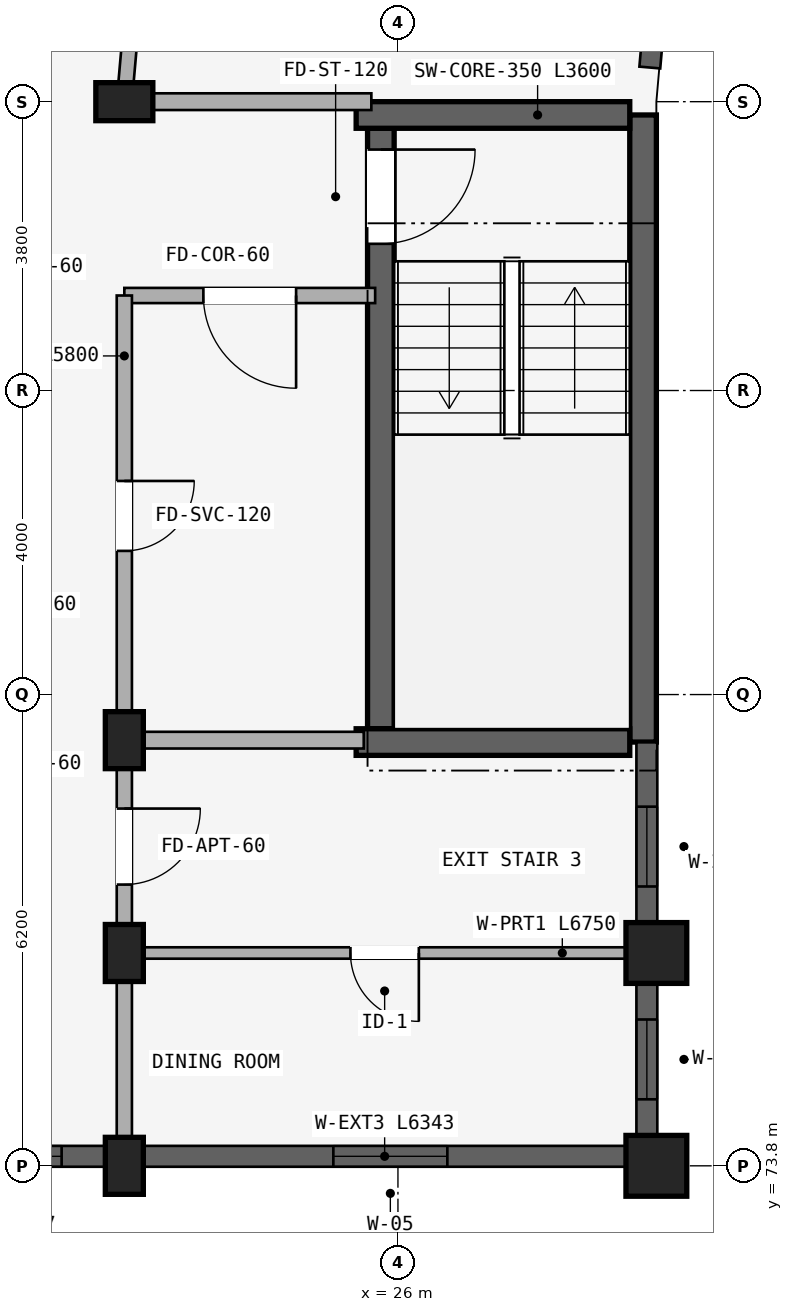
"""IFC4 building model, lengths in metres.
Left out: names, types, materials, properties, quantities, classifications, styles, units other than length and angle.
Written with IfcOpenShell. Run it as: python <this file> out.ifc"""

import sys

from ifc_helpers import new_model, si_unit, direction, frame, frame_2d, origin, origin_2d, place, context, subcontext, project, spatial, rectangle, extrude, element, fill, save


model = new_model("IFC4")
c1 = context("Model", 3, precision=1e-05, world=origin(), true_north=direction((0.0, 1.0)))
c2 = subcontext(c1, "Body", "Model", "MODEL_VIEW")
j1 = project(units=[si_unit("LENGTHUNIT", "METRE"), si_unit("PLANEANGLEUNIT", "RADIAN")], contexts=[c1])
p1 = place(None, origin())
s1 = spatial("IfcSite", under=j1, at=p1, CompositionType="ELEMENT")
p2 = place(p1, origin())
s2 = spatial("IfcBuilding", under=s1, at=p2, CompositionType="ELEMENT")
p3 = place(p2, frame((0.0, 0.0, 8.7)))
s3 = spatial("IfcBuildingStorey", under=s2, at=p3, CompositionType="ELEMENT", Elevation=8.7)
p4 = place(p3, frame((29.225, 87.625, 0.0), z_axis=(0.0, 0.0, 1.0), x_axis=(0.0, -1.0, 0.0)))
e1 = element("IfcWall", 1, at=p4, inside=s3, PredefinedType="SHEAR", context=c2, shape_type="SweptSolid", body=[
    extrude(rectangle(XDim=8.25, YDim=0.35, at=frame_2d((4.125, 0.0))), origin(), (0.0, 0.0, 1.0), 2.93),
])
p5 = place(p3, frame((25.775, 87.45, 0.0), z_axis=(0.0, 0.0, 1.0), x_axis=(0.0, -1.0, 0.0)))
e2 = element("IfcWall", 2, at=p5, inside=s3, PredefinedType="SHEAR", context=c2, shape_type="SweptSolid", body=[
    extrude(rectangle(XDim=7.9, YDim=0.35, at=frame_2d((3.95, 0.0))), origin(), (0.0, 0.0, 1.0), 2.93),
])
p6 = place(p5, frame((0.28, 0.0, 0.0)))
e3 = element("IfcOpeningElement", 3, at=p6, cuts=e2, PredefinedType="OPENING", context=c2, shape_type="SweptSolid", body=[
    extrude(rectangle(XDim=1.24, YDim=2.15, at=frame_2d((0.62, 1.075))), frame((0.0, 0.185, 0.0), z_axis=(0.0, -1.0, 0.0), x_axis=(1.0, 0.0, 0.0)), (0.0, 0.0, 1.0), 0.37),
])
for number, where, z_axis, x_axis in (
    (4, (29.05, 87.625, 0.0), (0.0, 0.0, 1.0), (-1.0, 0.0, 0.0)),
    (5, (29.05, 79.375, 0.0), (0.0, 0.0, 1.0), (-1.0, 0.0, 0.0)),
):
    element("IfcWall", number, at=place(p3, frame(where, z_axis=z_axis, x_axis=x_axis)), inside=s3, PredefinedType="SHEAR", context=c2, shape_type="SweptSolid", body=[
        extrude(rectangle(XDim=3.6, YDim=0.35, at=frame_2d((1.8, 0.0))), origin(), (0.0, 0.0, 1.0), 2.93),
    ])
for number, where, z_axis, x_axis in (
    (6, (22.4, 87.8, 0.0), (0.0, 0.0, 1.0), (0.0, 1.0, 0.0)),
    (7, (22.4, 79.4, 0.0), (0.0, 0.0, 1.0), (1.0, 0.0, 0.0)),
):
    element("IfcColumn", number, at=place(p3, frame(where, z_axis=z_axis, x_axis=x_axis)), inside=s3, PredefinedType="COLUMN", context=c2, shape_type="SweptSolid", body=[
        extrude(rectangle(XDim=0.5, YDim=0.75, at=origin_2d()), origin(), (0.0, 0.0, 1.0), 2.93),
    ])
p7 = place(p3, frame((29.4, 76.6, 0.0), z_axis=(0.0, 0.0, 1.0), x_axis=(1.0, 0.0, 0.0)))
e8 = element("IfcColumn", 8, at=p7, inside=s3, PredefinedType="COLUMN", context=c2, shape_type="SweptSolid", body=[
    extrude(rectangle(XDim=0.8, YDim=0.8, at=origin_2d()), origin(), (0.0, 0.0, 1.0), 2.93),
])
p8 = place(p3, frame((22.4, 76.6, 0.0), z_axis=(0.0, 0.0, 1.0), x_axis=(1.0, 0.0, 0.0)))
e9 = element("IfcColumn", 9, at=p8, inside=s3, PredefinedType="COLUMN", context=c2, shape_type="SweptSolid", body=[
    extrude(rectangle(XDim=0.5, YDim=0.75, at=origin_2d()), origin(), (0.0, 0.0, 1.0), 2.93),
])
p9 = place(p3, frame((29.4, 73.8, 0.0), z_axis=(0.0, 0.0, 1.0), x_axis=(1.0, 0.0, 0.0)))
e10 = element("IfcColumn", 10, at=p9, inside=s3, PredefinedType="COLUMN", context=c2, shape_type="SweptSolid", body=[
    extrude(rectangle(XDim=0.8, YDim=0.8, at=origin_2d()), origin(), (0.0, 0.0, 1.0), 2.93),
])
p10 = place(p3, frame((22.4, 73.8, 0.0), z_axis=(0.0, 0.0, 1.0), x_axis=(1.0, 0.0, 0.0)))
e11 = element("IfcColumn", 11, at=p10, inside=s3, PredefinedType="COLUMN", context=c2, shape_type="SweptSolid", body=[
    extrude(rectangle(XDim=0.5, YDim=0.75, at=origin_2d()), origin(), (0.0, 0.0, 1.0), 2.93),
])
p11 = place(p3, frame((25.7, 85.25, 0.0), z_axis=(0.0, 0.0, 1.0), x_axis=(-1.0, 0.0, 0.0)))
e12 = element("IfcWall", 12, at=p11, inside=s3, PredefinedType="STANDARD", context=c2, shape_type="SweptSolid", body=[
    extrude(rectangle(XDim=3.3, YDim=0.2, at=frame_2d((1.65, 0.0))), origin(), (0.0, 0.0, 1.0), 2.372),
])
p12 = place(p11, frame((1.04, 0.0, 0.0)))
e13 = element("IfcOpeningElement", 13, at=p12, cuts=e12, PredefinedType="OPENING", context=c2, shape_type="SweptSolid", body=[
    extrude(rectangle(XDim=1.22, YDim=2.15, at=frame_2d((0.61, 1.075))), frame((0.0, 0.11, 0.0), z_axis=(0.0, -1.0, 0.0), x_axis=(1.0, 0.0, 0.0)), (0.0, 0.0, 1.0), 0.22),
])
p13 = place(p3, frame((22.4, 85.25, 0.0), z_axis=(0.0, 0.0, 1.0), x_axis=(0.0, -1.0, 0.0)))
e14 = element("IfcWall", 14, at=p13, inside=s3, PredefinedType="STANDARD", context=c2, shape_type="SweptSolid", body=[
    extrude(rectangle(XDim=5.8, YDim=0.2, at=frame_2d((2.9, 0.0))), origin(), (0.0, 0.0, 1.0), 2.372),
])
p14 = place(p13, frame((2.44, 0.0, 0.0)))
e15 = element("IfcOpeningElement", 15, at=p14, cuts=e14, PredefinedType="OPENING", context=c2, shape_type="SweptSolid", body=[
    extrude(rectangle(XDim=0.92, YDim=2.1, at=frame_2d((0.46, 1.05))), frame((0.0, 0.11, 0.0), z_axis=(0.0, -1.0, 0.0), x_axis=(1.0, 0.0, 0.0)), (0.0, 0.0, 1.0), 0.22),
])
p15 = place(p3, frame((22.792, 92.28, 0.0), z_axis=(0.0, 0.0, 1.0), x_axis=(-0.087187153726, -0.996191949488, 0.0)))
e16 = element("IfcWall", 16, at=p15, inside=s3, PredefinedType="STANDARD", context=c2, shape_type="SweptSolid", body=[
    extrude(rectangle(XDim=4.497, YDim=0.2, at=frame_2d((2.249, 0.0))), origin(), (0.0, 0.0, 1.0), 2.372),
])
p16 = place(p3, frame((25.65, 87.8, 0.0), z_axis=(0.0, 0.0, 1.0), x_axis=(-1.0, 0.0, 0.0)))
e17 = element("IfcWall", 17, at=p16, inside=s3, PredefinedType="STANDARD", context=c2, shape_type="SweptSolid", body=[
    extrude(rectangle(XDim=3.2, YDim=0.22, at=frame_2d((1.6, 0.0))), origin(), (0.0, 0.0, 1.0), 2.372),
])
p17 = place(p3, frame((22.4, 79.4, 0.0), z_axis=(0.0, 0.0, 1.0), x_axis=(0.0, -1.0, 0.0)))
e18 = element("IfcWall", 18, at=p17, inside=s3, PredefinedType="STANDARD", context=c2, shape_type="SweptSolid", body=[
    extrude(rectangle(XDim=2.8, YDim=0.2, at=frame_2d((1.4, 0.0))), origin(), (0.0, 0.0, 1.0), 2.372),
])
p18 = place(p17, frame((0.9, 0.0, 0.0)))
e19 = element("IfcOpeningElement", 19, at=p18, cuts=e18, PredefinedType="OPENING", context=c2, shape_type="SweptSolid", body=[
    extrude(rectangle(XDim=1.0, YDim=2.15, at=frame_2d((0.5, 1.075))), frame((0.0, 0.11, 0.0), z_axis=(0.0, -1.0, 0.0), x_axis=(1.0, 0.0, 0.0)), (0.0, 0.0, 1.0), 0.22),
])
p19 = place(p3, frame((25.55, 79.4, 0.0), z_axis=(0.0, 0.0, 1.0), x_axis=(-1.0, 0.0, 0.0)))
e20 = element("IfcWall", 20, at=p19, inside=s3, PredefinedType="STANDARD", context=c2, shape_type="SweptSolid", body=[
    extrude(rectangle(XDim=3.1, YDim=0.22, at=frame_2d((1.55, 0.0))), origin(), (0.0, 0.0, 1.0), 2.372),
])
p20 = place(p3, frame((22.4, 76.6, 0.0), z_axis=(0.0, 0.0, 1.0), x_axis=(0.0, -1.0, 0.0)))
e21 = element("IfcWall", 21, at=p20, inside=s3, PredefinedType="STANDARD", context=c2, shape_type="SweptSolid", body=[
    extrude(rectangle(XDim=2.8, YDim=0.2, at=frame_2d((1.4, 0.0))), origin(), (0.0, 0.0, 1.0), 2.372),
])
p21 = place(p3, frame((29.2, 76.6, 0.0), z_axis=(0.0, 0.0, 1.0), x_axis=(-1.0, 0.0, 0.0)))
e22 = element("IfcWall", 22, at=p21, inside=s3, PredefinedType="PARTITIONING", context=c2, shape_type="SweptSolid", body=[
    extrude(rectangle(XDim=6.75, YDim=0.15, at=frame_2d((3.375, 0.0))), origin(), (0.0, 0.0, 1.0), 2.372),
])
p22 = place(p21, frame((2.925, 0.0, 0.0)))
e23 = element("IfcOpeningElement", 23, at=p22, cuts=e22, PredefinedType="OPENING", context=c2, shape_type="SweptSolid", body=[
    extrude(rectangle(XDim=0.9, YDim=2.1, at=frame_2d((0.45, 1.05))), frame((0.0, 0.085, 0.0), z_axis=(0.0, -1.0, 0.0), x_axis=(1.0, 0.0, 0.0)), (0.0, 0.0, 1.0), 0.17),
])
p23 = place(p3, frame((29.537, 90.797, 0.0), z_axis=(0.0, 0.0, 1.0), x_axis=(-0.08716102895, -0.996194235595, 0.0)))
e24 = element("IfcWall", 24, at=p23, inside=s3, PredefinedType="STANDARD", context=c2, shape_type="SweptSolid", body=[
    extrude(rectangle(XDim=2.557, YDim=0.275, at=frame_2d((1.279, 0.0))), origin(), (0.0, 0.0, 1.0), 2.472),
])
p24 = place(p23, frame((0.609, 0.0, 0.622)))
e25 = element("IfcOpeningElement", 25, at=p24, cuts=e24, PredefinedType="OPENING", context=c2, shape_type="SweptSolid", body=[
    extrude(rectangle(XDim=1.5, YDim=1.65, at=frame_2d((0.75, 0.825))), frame((0.0, 0.147, 0.0), z_axis=(0.0, -1.0, 0.0), x_axis=(1.0, 0.0, 0.0)), (0.0, 0.0, 1.0), 0.295),
])
p25 = place(p3, frame((29.275, 79.372, 0.0), z_axis=(0.0, 0.0, 1.0), x_axis=(0.0, -1.0, 0.0)))
e26 = element("IfcWall", 26, at=p25, inside=s3, PredefinedType="STANDARD", context=c2, shape_type="SweptSolid", body=[
    extrude(rectangle(XDim=2.368, YDim=0.275, at=frame_2d((1.184, 0.0))), origin(), (0.0, 0.0, 1.0), 2.472),
])
p26 = place(p25, frame((0.846, 0.0, 0.88)))
e27 = element("IfcOpeningElement", 27, at=p26, cuts=e26, PredefinedType="OPENING", context=c2, shape_type="SweptSolid", body=[
    extrude(rectangle(XDim=1.05, YDim=1.25, at=frame_2d((0.525, 0.625))), frame((0.0, 0.147, 0.0), z_axis=(0.0, -1.0, 0.0), x_axis=(1.0, 0.0, 0.0)), (0.0, 0.0, 1.0), 0.295),
])
p27 = place(p3, frame((29.275, 76.197, 0.0), z_axis=(0.0, 0.0, 1.0), x_axis=(0.0, -1.0, 0.0)))
e28 = element("IfcWall", 28, at=p27, inside=s3, PredefinedType="STANDARD", context=c2, shape_type="SweptSolid", body=[
    extrude(rectangle(XDim=1.993, YDim=0.275, at=frame_2d((0.997, 0.0))), origin(), (0.0, 0.0, 1.0), 2.472),
])
p28 = place(p27, frame((0.471, 0.0, 0.88)))
e29 = element("IfcOpeningElement", 29, at=p28, cuts=e28, PredefinedType="OPENING", context=c2, shape_type="SweptSolid", body=[
    extrude(rectangle(XDim=1.05, YDim=1.25, at=frame_2d((0.525, 0.625))), frame((0.0, 0.147, 0.0), z_axis=(0.0, -1.0, 0.0), x_axis=(1.0, 0.0, 0.0)), (0.0, 0.0, 1.0), 0.295),
])
p29 = place(p3, frame((28.997, 73.925, 0.0), z_axis=(0.0, 0.0, 1.0), x_axis=(-1.0, 0.0, 0.0)))
e30 = element("IfcWall", 30, at=p29, inside=s3, PredefinedType="STANDARD", context=c2, shape_type="SweptSolid", body=[
    extrude(rectangle(XDim=6.343, YDim=0.275, at=frame_2d((3.171, 0.0))), origin(), (0.0, 0.0, 1.0), 2.372),
])
p30 = place(p29, frame((2.346, 0.0, 0.522)))
e31 = element("IfcOpeningElement", 31, at=p30, cuts=e30, PredefinedType="OPENING", context=c2, shape_type="SweptSolid", body=[
    extrude(rectangle(XDim=1.5, YDim=1.65, at=frame_2d((0.75, 0.825))), frame((0.0, 0.147, 0.0), z_axis=(0.0, -1.0, 0.0), x_axis=(1.0, 0.0, 0.0)), (0.0, 0.0, 1.0), 0.295),
])
p31 = place(p3, frame((22.146, 73.925, 0.0), z_axis=(0.0, 0.0, 1.0), x_axis=(-1.0, 0.0, 0.0)))
e32 = element("IfcWall", 32, at=p31, inside=s3, PredefinedType="STANDARD", context=c2, shape_type="SweptSolid", body=[
    extrude(rectangle(XDim=1.893, YDim=0.275, at=frame_2d((0.947, 0.0))), origin(), (0.0, 0.0, 1.0), 2.372),
])
p32 = place(p31, frame((0.572, 0.0, 0.88)))
e33 = element("IfcOpeningElement", 33, at=p32, cuts=e32, PredefinedType="OPENING", context=c2, shape_type="SweptSolid", body=[
    extrude(rectangle(XDim=0.75, YDim=1.05, at=frame_2d((0.375, 0.525))), frame((0.0, 0.147, 0.0), z_axis=(0.0, -1.0, 0.0), x_axis=(1.0, 0.0, 0.0)), (0.0, 0.0, 1.0), 0.295),
])
p33 = place(p26, origin())
e34 = element("IfcWindow", 34, at=p33, inside=s3, PartitioningType="SINGLE_PANEL", PredefinedType="WINDOW", context=c2, shape_type="SweptSolid", body=[
    extrude(rectangle(XDim=1.05, YDim=1.25, at=frame_2d((0.525, 0.625))), frame((0.0, 0.03, 0.0), z_axis=(0.0, -1.0, 0.0), x_axis=(1.0, 0.0, 0.0)), (0.0, 0.0, 1.0), 0.06),
])
fill(e27, e34)
p34 = place(p28, origin())
e35 = element("IfcWindow", 35, at=p34, inside=s3, PartitioningType="SINGLE_PANEL", PredefinedType="WINDOW", context=c2, shape_type="SweptSolid", body=[
    extrude(rectangle(XDim=1.05, YDim=1.25, at=frame_2d((0.525, 0.625))), frame((0.0, 0.03, 0.0), z_axis=(0.0, -1.0, 0.0), x_axis=(1.0, 0.0, 0.0)), (0.0, 0.0, 1.0), 0.06),
])
fill(e29, e35)
p35 = place(p30, origin())
e36 = element("IfcWindow", 36, at=p35, inside=s3, PartitioningType="DOUBLE_PANEL_VERTICAL", PredefinedType="WINDOW", context=c2, shape_type="SweptSolid", body=[
    extrude(rectangle(XDim=1.5, YDim=1.65, at=frame_2d((0.75, 0.825))), frame((0.0, 0.03, 0.0), z_axis=(0.0, -1.0, 0.0), x_axis=(1.0, 0.0, 0.0)), (0.0, 0.0, 1.0), 0.06),
])
fill(e31, e36)
p36 = place(p32, origin())
e37 = element("IfcWindow", 37, at=p36, inside=s3, PartitioningType="SINGLE_PANEL", PredefinedType="WINDOW", context=c2, shape_type="SweptSolid", body=[
    extrude(rectangle(XDim=0.75, YDim=1.05, at=frame_2d((0.375, 0.525))), frame((0.0, 0.03, 0.0), z_axis=(0.0, -1.0, 0.0), x_axis=(1.0, 0.0, 0.0)), (0.0, 0.0, 1.0), 0.06),
])
fill(e33, e37)
p37 = place(p6, origin())
e38 = element("IfcDoor", 38, at=p37, inside=s3, OperationType="SINGLE_SWING_LEFT", PredefinedType="DOOR", context=c2, shape_type="SweptSolid", body=[
    extrude(rectangle(XDim=1.24, YDim=2.15, at=frame_2d((0.62, 1.075))), frame((0.0, 0.025, 0.0), z_axis=(0.0, -1.0, 0.0), x_axis=(1.0, 0.0, 0.0)), (0.0, 0.0, 1.0), 0.05),
])
fill(e3, e38)
p38 = place(p12, origin())
e39 = element("IfcDoor", 39, at=p38, inside=s3, OperationType="SINGLE_SWING_LEFT", PredefinedType="DOOR", context=c2, shape_type="SweptSolid", body=[
    extrude(rectangle(XDim=1.22, YDim=2.15, at=frame_2d((0.61, 1.075))), frame((0.0, 0.025, 0.0), z_axis=(0.0, -1.0, 0.0), x_axis=(1.0, 0.0, 0.0)), (0.0, 0.0, 1.0), 0.05),
])
fill(e13, e39)
p39 = place(p14, frame((0.92, 0.0, 0.0), z_axis=(0.0, 0.0, 1.0), x_axis=(-1.0, 0.0, 0.0)))
e40 = element("IfcDoor", 40, at=p39, inside=s3, OperationType="SINGLE_SWING_RIGHT", PredefinedType="DOOR", context=c2, shape_type="SweptSolid", body=[
    extrude(rectangle(XDim=0.92, YDim=2.1, at=frame_2d((0.46, 1.05))), frame((0.0, 0.025, 0.0), z_axis=(0.0, -1.0, 0.0), x_axis=(1.0, 0.0, 0.0)), (0.0, 0.0, 1.0), 0.05),
])
fill(e15, e40)
p40 = place(p18, frame((1.0, 0.0, 0.0), z_axis=(0.0, 0.0, 1.0), x_axis=(-1.0, 0.0, 0.0)))
e41 = element("IfcDoor", 41, at=p40, inside=s3, OperationType="SINGLE_SWING_RIGHT", PredefinedType="DOOR", context=c2, shape_type="SweptSolid", body=[
    extrude(rectangle(XDim=1.0, YDim=2.15, at=frame_2d((0.5, 1.075))), frame((0.0, 0.025, 0.0), z_axis=(0.0, -1.0, 0.0), x_axis=(1.0, 0.0, 0.0)), (0.0, 0.0, 1.0), 0.05),
])
fill(e19, e41)
p41 = place(p22, frame((0.9, 0.0, 0.0), z_axis=(0.0, 0.0, 1.0), x_axis=(-1.0, 0.0, 0.0)))
e42 = element("IfcDoor", 42, at=p41, inside=s3, OperationType="SINGLE_SWING_RIGHT", PredefinedType="DOOR", context=c2, shape_type="SweptSolid", body=[
    extrude(rectangle(XDim=0.9, YDim=2.1, at=frame_2d((0.45, 1.05))), frame((0.0, 0.025, 0.0), z_axis=(0.0, -1.0, 0.0), x_axis=(1.0, 0.0, 0.0)), (0.0, 0.0, 1.0), 0.05),
])
fill(e23, e42)
save(model, sys.argv[1])
